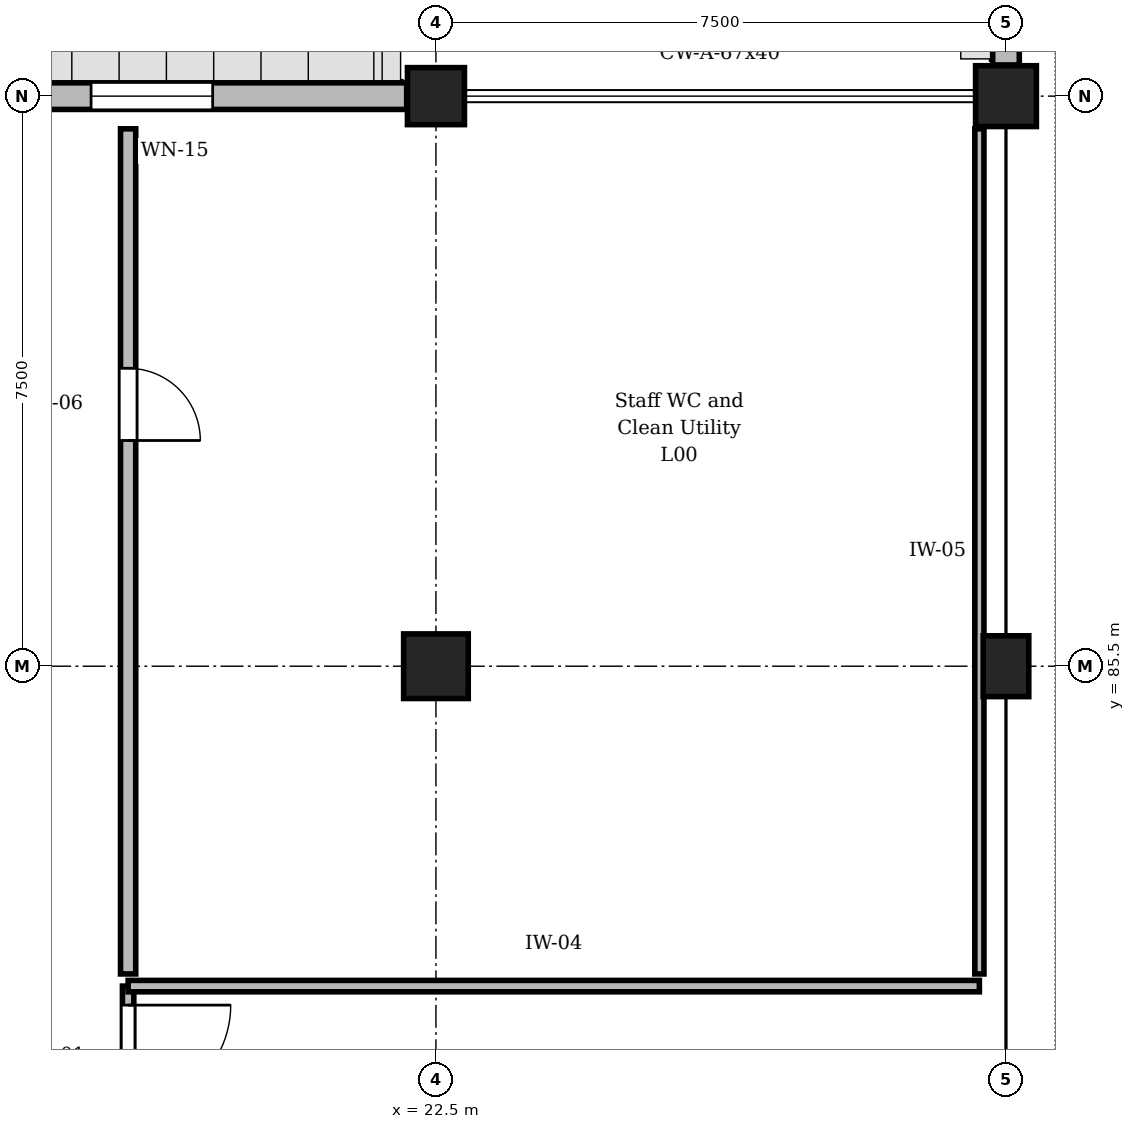
"""IFC4 building model, lengths in metres.
Left out: names, types, materials, properties, quantities, classifications, styles, units other than length and angle.
Written with IfcOpenShell. Run it as: python <this file> out.ifc"""

import sys

from ifc_helpers import new_model, si_unit, direction, frame, frame_2d, origin, origin_2d, place, context, subcontext, project, spatial, rectangle, circle, extrude, element, fill, save


model = new_model("IFC4")
c1 = context("Model", 3, precision=1e-05, world=origin(), true_north=direction((0.0, 1.0)))
c2 = subcontext(c1, "Body", "Model", "MODEL_VIEW")
j1 = project(units=[si_unit("LENGTHUNIT", "METRE"), si_unit("PLANEANGLEUNIT", "RADIAN")], contexts=[c1])
p1 = place(None, origin())
s1 = spatial("IfcSite", under=j1, at=p1, CompositionType="ELEMENT")
p2 = place(p1, origin())
s2 = spatial("IfcBuilding", under=s1, at=p2, CompositionType="ELEMENT")
p3 = place(p2, origin())
s3 = spatial("IfcBuildingStorey", under=s2, at=p3, CompositionType="ELEMENT", Elevation=0.0)
p4 = place(p3, frame((22.5, 85.5, 0.0), z_axis=(0.0, 0.0, 1.0), x_axis=(1.0, 0.0, 0.0)))
e1 = element("IfcColumn", 1, at=p4, inside=s3, PredefinedType="COLUMN", context=c2, shape_type="SweptSolid", body=[
    extrude(rectangle(XDim=0.85, YDim=0.85, at=origin_2d()), origin(), (0.0, 0.0, 1.0), 4.8),
])
p5 = place(p3, frame((22.5, 93.0, 0.0), z_axis=(0.0, 0.0, 1.0), x_axis=(1.0, 0.0, 0.0)))
e2 = element("IfcColumn", 2, at=p5, inside=s3, PredefinedType="COLUMN", context=c2, shape_type="SweptSolid", body=[
    extrude(circle(Radius=0.375, at=origin_2d()), origin(), (0.0, 0.0, 1.0), 4.8),
])
p6 = place(p3, frame((30.0, 85.5, 0.0), z_axis=(0.0, 0.0, 1.0), x_axis=(1.0, 0.0, 0.0)))
e3 = element("IfcColumn", 3, at=p6, inside=s3, PredefinedType="COLUMN", context=c2, shape_type="SweptSolid", body=[
    extrude(rectangle(XDim=0.6, YDim=0.8, at=origin_2d()), origin(), (0.0, 0.0, 1.0), 4.8),
])
p7 = place(p3, frame((30.0, 93.0, 0.0), z_axis=(0.0, 0.0, 1.0), x_axis=(1.0, 0.0, 0.0)))
e4 = element("IfcColumn", 4, at=p7, inside=s3, PredefinedType="COLUMN", context=c2, shape_type="SweptSolid", body=[
    extrude(rectangle(XDim=0.8, YDim=0.8, at=origin_2d()), origin(), (0.0, 0.0, 1.0), 4.8),
])
p8 = place(p3, frame((15.41, 93.0, 0.0), z_axis=(0.0, 0.0, 1.0), x_axis=(1.0, 0.0, 0.0)))
e5 = element("IfcWall", 5, at=p8, inside=s3, PredefinedType="STANDARD", context=c2, shape_type="SweptSolid", body=[
    extrude(rectangle(XDim=6.705, YDim=0.35, at=frame_2d((3.353, 0.0))), origin(), (0.0, 0.0, 1.0), 3.95),
])
p9 = place(p8, frame((2.552, 0.0, 0.9)))
e6 = element("IfcOpeningElement", 6, at=p9, cuts=e5, PredefinedType="OPENING", context=c2, shape_type="SweptSolid", body=[
    extrude(rectangle(XDim=1.6, YDim=1.8, at=frame_2d((0.8, 0.9))), frame((0.0, 0.185, 0.0), z_axis=(0.0, -1.0, 0.0), x_axis=(1.0, 0.0, 0.0)), (0.0, 0.0, 1.0), 0.37),
])
p10 = place(p3, frame((30.0, 93.41, 0.0), z_axis=(0.0, 0.0, 1.0), x_axis=(0.0, 1.0, 0.0)))
e7 = element("IfcWall", 7, at=p10, inside=s3, PredefinedType="STANDARD", context=c2, shape_type="SweptSolid", body=[
    extrude(rectangle(XDim=6.755, YDim=0.35, at=frame_2d((3.377, 0.0))), origin(), (0.0, 0.0, 1.0), 3.9),
])
p11 = place(p10, frame((2.478, 0.0, 0.9)))
e8 = element("IfcOpeningElement", 8, at=p11, cuts=e7, PredefinedType="OPENING", context=c2, shape_type="SweptSolid", body=[
    extrude(rectangle(XDim=1.8, YDim=2.4, at=frame_2d((0.9, 1.2))), frame((0.0, 0.185, 0.0), z_axis=(0.0, -1.0, 0.0), x_axis=(1.0, 0.0, 0.0)), (0.0, 0.0, 1.0), 0.37),
])
p12 = place(p3, frame((18.45, 81.292, 0.0), z_axis=(0.0, 0.0, 1.0), x_axis=(0.0, -1.0, 0.0)))
e9 = element("IfcWall", 9, at=p12, inside=s3, PredefinedType="PARTITIONING", context=c2, shape_type="SweptSolid", body=[
    extrude(rectangle(XDim=11.119, YDim=0.15, at=frame_2d((5.559, 0.0))), origin(), (0.0, 0.0, 1.0), 4.085),
])
p13 = place(p12, frame((0.25, 0.0, 0.0)))
e10 = element("IfcOpeningElement", 10, at=p13, cuts=e9, PredefinedType="OPENING", context=c2, shape_type="SweptSolid", body=[
    extrude(rectangle(XDim=1.35, YDim=2.25, at=frame_2d((0.675, 1.125))), frame((0.0, 0.085, 0.0), z_axis=(0.0, -1.0, 0.0), x_axis=(1.0, 0.0, 0.0)), (0.0, 0.0, 1.0), 0.17),
])
p14 = place(p3, frame((18.45, 92.57, 0.0), z_axis=(0.0, 0.0, 1.0), x_axis=(0.0, -1.0, 0.0)))
e11 = element("IfcWall", 11, at=p14, inside=s3, PredefinedType="STANDARD", context=c2, shape_type="SweptSolid", body=[
    extrude(rectangle(XDim=11.119, YDim=0.2, at=frame_2d((5.559, 0.0))), origin(), (0.0, 0.0, 1.0), 4.085),
])
p15 = place(p14, frame((3.151, 0.0, 0.0)))
e12 = element("IfcOpeningElement", 12, at=p15, cuts=e11, PredefinedType="OPENING", context=c2, shape_type="SweptSolid", body=[
    extrude(rectangle(XDim=0.95, YDim=2.15, at=frame_2d((0.475, 1.075))), frame((0.0, 0.11, 0.0), z_axis=(0.0, -1.0, 0.0), x_axis=(1.0, 0.0, 0.0)), (0.0, 0.0, 1.0), 0.22),
])
p16 = place(p3, frame((18.45, 81.292, 0.0), z_axis=(0.0, 0.0, 1.0), x_axis=(1.0, 0.0, 0.0)))
e13 = element("IfcWall", 13, at=p16, inside=s3, PredefinedType="PARTITIONING", context=c2, shape_type="SweptSolid", body=[
    extrude(rectangle(XDim=11.2, YDim=0.15, at=frame_2d((5.6, 0.0))), origin(), (0.0, 0.0, 1.0), 4.485),
])
p17 = place(p3, frame((29.65, 81.451, 0.0), z_axis=(0.0, 0.0, 1.0), x_axis=(0.0, 1.0, 0.0)))
e14 = element("IfcWall", 14, at=p17, inside=s3, PredefinedType="PARTITIONING", context=c2, shape_type="SweptSolid", body=[
    extrude(rectangle(XDim=11.119, YDim=0.12, at=frame_2d((5.559, 0.0))), origin(), (0.0, 0.0, 1.0), 3.785),
])
p18 = place(p9, origin())
e15 = element("IfcWindow", 15, at=p18, inside=s3, PartitioningType="SINGLE_PANEL", PredefinedType="WINDOW", context=c2, shape_type="SweptSolid", body=[
    extrude(rectangle(XDim=1.6, YDim=1.8, at=frame_2d((0.8, 0.9))), frame((0.0, 0.03, 0.0), z_axis=(0.0, -1.0, 0.0), x_axis=(1.0, 0.0, 0.0)), (0.0, 0.0, 1.0), 0.06),
])
fill(e6, e15)
p19 = place(p13, origin())
e16 = element("IfcDoor", 16, at=p19, inside=s3, OperationType="SINGLE_SWING_LEFT", PredefinedType="DOOR", context=c2, shape_type="SweptSolid", body=[
    extrude(rectangle(XDim=1.35, YDim=2.25, at=frame_2d((0.675, 1.125))), frame((0.0, 0.025, 0.0), z_axis=(0.0, -1.0, 0.0), x_axis=(1.0, 0.0, 0.0)), (0.0, 0.0, 1.0), 0.05),
])
fill(e10, e16)
p20 = place(p15, origin())
e17 = element("IfcDoor", 17, at=p20, inside=s3, OperationType="SINGLE_SWING_RIGHT", PredefinedType="DOOR", context=c2, shape_type="SweptSolid", body=[
    extrude(rectangle(XDim=0.95, YDim=2.15, at=frame_2d((0.475, 1.075))), frame((0.0, 0.025, 0.0), z_axis=(0.0, -1.0, 0.0), x_axis=(1.0, 0.0, 0.0)), (0.0, 0.0, 1.0), 0.05),
])
fill(e12, e17)
save(model, sys.argv[1])
